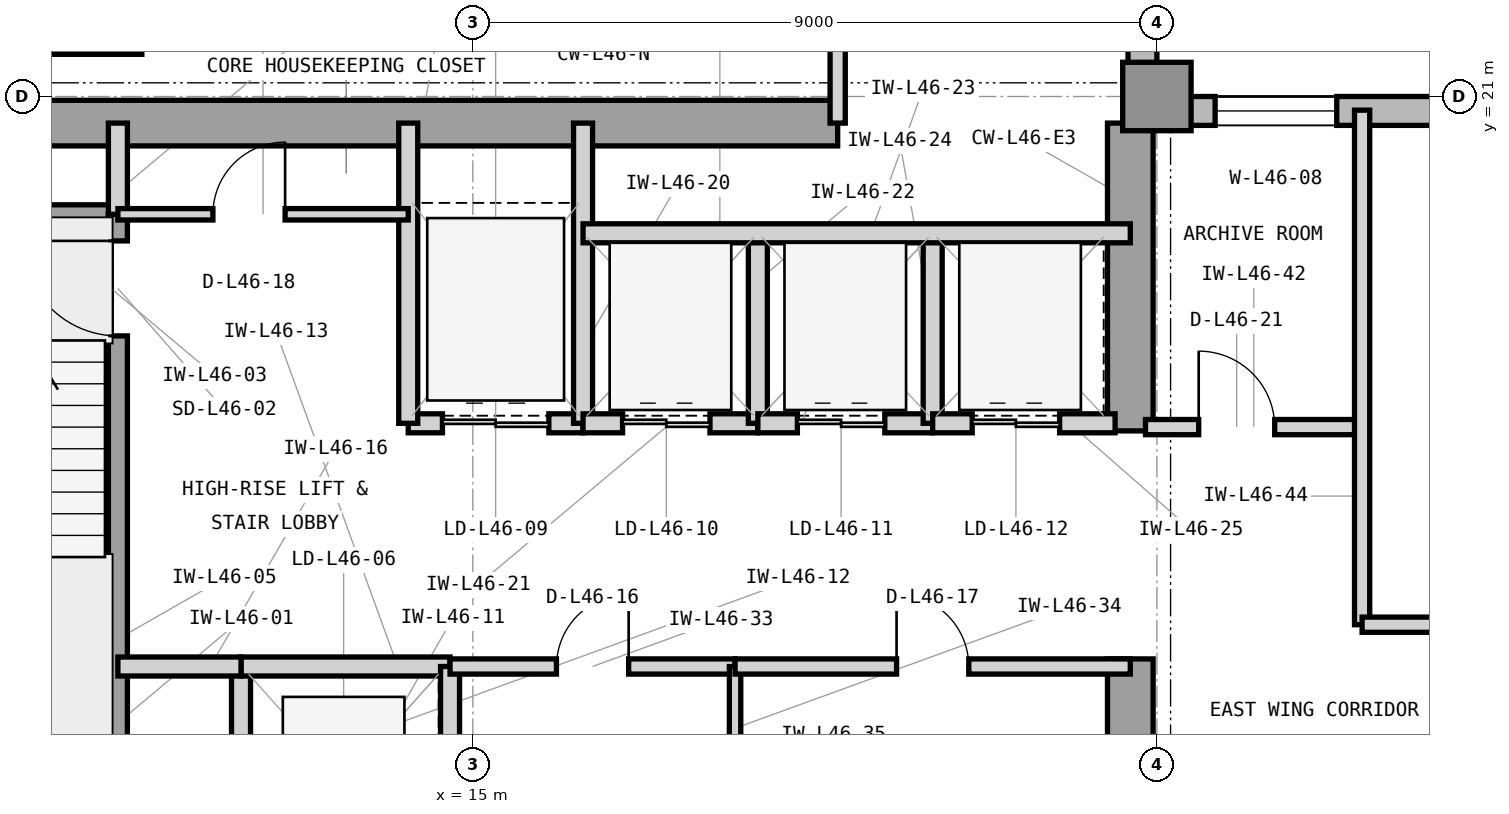
"""IFC4 building model, lengths in metres.
Left out: names, types, materials, properties, quantities, classifications, styles, units other than length and angle.
Written with IfcOpenShell. Run it as: python <this file> out.ifc"""

import sys

from ifc_helpers import new_model, si_unit, direction, frame, frame_2d, origin, origin_2d, place, context, subcontext, project, spatial, rectangle, extrude, element, fill, save


model = new_model("IFC4")
c1 = context("Model", 3, precision=1e-05, world=origin(), true_north=direction((0.0, 1.0)))
c2 = subcontext(c1, "Body", "Model", "MODEL_VIEW")
j1 = project(units=[si_unit("LENGTHUNIT", "METRE"), si_unit("PLANEANGLEUNIT", "RADIAN")], contexts=[c1])
p1 = place(None, origin())
s1 = spatial("IfcSite", under=j1, at=p1, CompositionType="ELEMENT")
p2 = place(p1, origin())
s2 = spatial("IfcBuilding", under=s1, at=p2, CompositionType="ELEMENT")
p3 = place(p2, frame((0.0, 0.0, 191.7)))
s3 = spatial("IfcBuildingStorey", under=s2, at=p3, CompositionType="ELEMENT", Elevation=191.7)
p4 = place(p3, frame((7.475, 20.65, 0.0), z_axis=(0.0, 0.0, 1.0), x_axis=(1.0, 0.0, 0.0)))
e1 = element("IfcWall", 1, at=p4, inside=s3, PredefinedType="SHEAR", context=c2, shape_type="SweptSolid", body=[
    extrude(rectangle(XDim=12.325, YDim=0.6, at=frame_2d((6.163, 0.0))), origin(), (0.0, 0.0, 1.0), 3.9),
])
p5 = place(p3, frame((23.65, 10.4, 0.0), z_axis=(0.0, 0.0, 1.0), x_axis=(0.0, 1.0, 0.0)))
e2 = element("IfcWall", 2, at=p5, inside=s3, PredefinedType="SHEAR", context=c2, shape_type="SweptSolid", body=[
    extrude(rectangle(XDim=3.2, YDim=0.6, at=frame_2d((1.6, 0.0))), origin(), (0.0, 0.0, 1.0), 3.9),
])
p6 = place(p3, frame((23.65, 16.6, 0.0), z_axis=(0.0, 0.0, 1.0), x_axis=(0.0, 1.0, 0.0)))
e3 = element("IfcWall", 3, at=p6, inside=s3, PredefinedType="SHEAR", context=c2, shape_type="SweptSolid", body=[
    extrude(rectangle(XDim=4.05, YDim=0.6, at=frame_2d((2.025, 0.0))), origin(), (0.0, 0.0, 1.0), 3.9),
])
p7 = place(p3, frame((24.0, 21.0, 0.0), z_axis=(0.0, 0.0, 1.0), x_axis=(1.0, 0.0, 0.0)))
e4 = element("IfcColumn", 4, at=p7, inside=s3, PredefinedType="COLUMN", context=c2, shape_type="SweptSolid", body=[
    extrude(rectangle(XDim=0.9, YDim=0.9, at=origin_2d()), origin(), (0.0, 0.0, 1.0), 3.9),
])
p8 = place(p3, frame((55.4, 20.81, 0.0), z_axis=(0.0, 0.0, 1.0), x_axis=(-1.0, 0.0, 0.0)))
e5 = element("IfcWall", 5, at=p8, inside=s3, PredefinedType="STANDARD", context=c2, shape_type="SweptSolid", body=[
    extrude(rectangle(XDim=31.4, YDim=0.38, at=frame_2d((15.7, 0.0))), origin(), (0.0, 0.0, 1.0), 3.7),
])
p9 = place(p8, frame((17.167, 0.0, 0.9)))
e6 = element("IfcOpeningElement", 6, at=p9, cuts=e5, PredefinedType="OPENING", context=c2, shape_type="SweptSolid", body=[
    extrude(rectangle(XDim=2.3, YDim=2.2, at=frame_2d((1.15, 1.1))), frame((0.0, 0.2, 0.0), z_axis=(0.0, -1.0, 0.0), x_axis=(1.0, 0.0, 0.0)), (0.0, 0.0, 1.0), 0.4),
])
p10 = place(p8, frame((29.034, 0.0, 0.9)))
e7 = element("IfcOpeningElement", 7, at=p10, cuts=e5, PredefinedType="OPENING", context=c2, shape_type="SweptSolid", body=[
    extrude(rectangle(XDim=1.6, YDim=2.2, at=frame_2d((0.8, 1.1))), frame((0.0, 0.2, 0.0), z_axis=(0.0, -1.0, 0.0), x_axis=(1.0, 0.0, 0.0)), (0.0, 0.0, 1.0), 0.4),
])
p11 = place(p8, frame((8.354, 0.0, 0.9)))
e8 = element("IfcOpeningElement", 8, at=p11, cuts=e5, PredefinedType="OPENING", context=c2, shape_type="SweptSolid", body=[
    extrude(rectangle(XDim=2.3, YDim=2.2, at=frame_2d((1.15, 1.1))), frame((0.0, 0.2, 0.0), z_axis=(0.0, -1.0, 0.0), x_axis=(1.0, 0.0, 0.0)), (0.0, 0.0, 1.0), 0.4),
])
p12 = place(p3, frame((23.81, 21.0, 0.0), z_axis=(0.0, 0.0, 1.0), x_axis=(0.0, 1.0, 0.0)))
e9 = element("IfcWall", 9, at=p12, inside=s3, PredefinedType="STANDARD", context=c2, shape_type="SweptSolid", body=[
    extrude(rectangle(XDim=22.4, YDim=0.38, at=frame_2d((11.2, 0.0))), origin(), (0.0, 0.0, 1.0), 3.7),
])
p13 = place(p3, frame((7.7, 19.45, 0.0), z_axis=(0.0, 0.0, 1.0), x_axis=(1.0, 0.0, 0.0)))
e10 = element("IfcWall", 10, at=p13, inside=s3, PredefinedType="SHEAR", context=c2, shape_type="SweptSolid", body=[
    extrude(rectangle(XDim=2.755, YDim=0.25, at=frame_2d((1.377, 0.0))), origin(), (0.0, 0.0, 1.0), 3.9),
])
p14 = place(p3, frame((10.33, 12.0, 0.0), z_axis=(0.0, 0.0, 1.0), x_axis=(0.0, 1.0, 0.0)))
e11 = element("IfcWall", 11, at=p14, inside=s3, PredefinedType="SHEAR", context=c2, shape_type="SweptSolid", body=[
    extrude(rectangle(XDim=7.45, YDim=0.25, at=frame_2d((3.725, 0.0))), origin(), (0.0, 0.0, 1.0), 3.9),
])
p15 = place(p14, frame((5.85, 0.0, 0.0)))
e12 = element("IfcOpeningElement", 12, at=p15, cuts=e11, PredefinedType="OPENING", context=c2, shape_type="SweptSolid", body=[
    extrude(rectangle(XDim=1.25, YDim=2.2, at=frame_2d((0.625, 1.1))), frame((0.0, 0.135, 0.0), z_axis=(0.0, -1.0, 0.0), x_axis=(1.0, 0.0, 0.0)), (0.0, 0.0, 1.0), 0.27),
])
p16 = place(p3, frame((10.33, 19.45, 0.0), z_axis=(0.0, 0.0, 1.0), x_axis=(0.0, 1.0, 0.0)))
e13 = element("IfcWall", 13, at=p16, inside=s3, PredefinedType="PARTITIONING", context=c2, shape_type="SweptSolid", body=[
    extrude(rectangle(XDim=1.2, YDim=0.25, at=frame_2d((0.6, 0.0))), origin(), (0.0, 0.0, 1.0), 3.073),
])
p17 = place(p3, frame((11.95, 10.5, 0.0), z_axis=(0.0, 0.0, 1.0), x_axis=(0.0, 1.0, 0.0)))
e14 = element("IfcWall", 14, at=p17, inside=s3, PredefinedType="PARTITIONING", context=c2, shape_type="SweptSolid", body=[
    extrude(rectangle(XDim=3.0, YDim=0.25, at=frame_2d((1.5, 0.0))), origin(), (0.0, 0.0, 1.0), 3.69),
])
p18 = place(p3, frame((11.95, 13.5, 0.0), z_axis=(0.0, 0.0, 1.0), x_axis=(1.0, 0.0, 0.0)))
e15 = element("IfcWall", 15, at=p18, inside=s3, PredefinedType="PARTITIONING", context=c2, shape_type="SweptSolid", body=[
    extrude(rectangle(XDim=2.75, YDim=0.25, at=frame_2d((1.375, 0.0))), origin(), (0.0, 0.0, 1.0), 3.283),
])
p19 = place(p3, frame((14.7, 10.5, 0.0), z_axis=(0.0, 0.0, 1.0), x_axis=(0.0, 1.0, 0.0)))
e16 = element("IfcWall", 16, at=p19, inside=s3, PredefinedType="PARTITIONING", context=c2, shape_type="SweptSolid", body=[
    extrude(rectangle(XDim=3.0, YDim=0.25, at=frame_2d((1.5, 0.0))), origin(), (0.0, 0.0, 1.0), 3.69),
])
p20 = place(p3, frame((10.33, 13.5, 0.0), z_axis=(0.0, 0.0, 1.0), x_axis=(1.0, 0.0, 0.0)))
e17 = element("IfcWall", 17, at=p20, inside=s3, PredefinedType="PARTITIONING", context=c2, shape_type="SweptSolid", body=[
    extrude(rectangle(XDim=1.62, YDim=0.25, at=frame_2d((0.81, 0.0))), origin(), (0.0, 0.0, 1.0), 3.283),
])
p21 = place(p3, frame((14.15, 16.7, 0.0), z_axis=(0.0, 0.0, 1.0), x_axis=(1.0, 0.0, 0.0)))
e18 = element("IfcWall", 18, at=p21, inside=s3, PredefinedType="PARTITIONING", context=c2, shape_type="SweptSolid", body=[
    extrude(rectangle(XDim=2.3, YDim=0.25, at=frame_2d((1.15, 0.0))), origin(), (0.0, 0.0, 1.0), 3.283),
])
p22 = place(p21, frame((0.45, 0.0, 0.0)))
e19 = element("IfcOpeningElement", 19, at=p22, cuts=e18, PredefinedType="OPENING", context=c2, shape_type="SweptSolid", body=[
    extrude(rectangle(XDim=1.4, YDim=2.35, at=frame_2d((0.7, 1.175))), frame((0.0, 0.135, 0.0), z_axis=(0.0, -1.0, 0.0), x_axis=(1.0, 0.0, 0.0)), (0.0, 0.0, 1.0), 0.27),
])
for number, where, z_axis, x_axis in (
    (20, (14.15, 16.7, 0.0), (0.0, 0.0, 1.0), (0.0, 1.0, 0.0)),
    (21, (16.45, 16.7, 0.0), (0.0, 0.0, 1.0), (0.0, 1.0, 0.0)),
):
    element("IfcWall", number, at=place(p3, frame(where, z_axis=z_axis, x_axis=x_axis)), inside=s3, PredefinedType="PARTITIONING", context=c2, shape_type="SweptSolid", body=[
        extrude(rectangle(XDim=3.95, YDim=0.25, at=frame_2d((1.975, 0.0))), origin(), (0.0, 0.0, 1.0), 3.69),
    ])
p23 = place(p3, frame((16.45, 16.7, 0.0), z_axis=(0.0, 0.0, 1.0), x_axis=(1.0, 0.0, 0.0)))
e22 = element("IfcWall", 22, at=p23, inside=s3, PredefinedType="PARTITIONING", context=c2, shape_type="SweptSolid", body=[
    extrude(rectangle(XDim=2.3, YDim=0.25, at=frame_2d((1.15, 0.0))), origin(), (0.0, 0.0, 1.0), 3.283),
])
p24 = place(p23, frame((0.52, 0.0, 0.0)))
e23 = element("IfcOpeningElement", 23, at=p24, cuts=e22, PredefinedType="OPENING", context=c2, shape_type="SweptSolid", body=[
    extrude(rectangle(XDim=1.15, YDim=2.25, at=frame_2d((0.575, 1.125))), frame((0.0, 0.135, 0.0), z_axis=(0.0, -1.0, 0.0), x_axis=(1.0, 0.0, 0.0)), (0.0, 0.0, 1.0), 0.27),
])
p25 = place(p3, frame((18.75, 16.7, 0.0), z_axis=(0.0, 0.0, 1.0), x_axis=(0.0, 1.0, 0.0)))
e24 = element("IfcWall", 24, at=p25, inside=s3, PredefinedType="PARTITIONING", context=c2, shape_type="SweptSolid", body=[
    extrude(rectangle(XDim=2.5, YDim=0.25, at=frame_2d((1.25, 0.0))), origin(), (0.0, 0.0, 1.0), 3.69),
])
p26 = place(p3, frame((18.75, 16.7, 0.0), z_axis=(0.0, 0.0, 1.0), x_axis=(1.0, 0.0, 0.0)))
e25 = element("IfcWall", 25, at=p26, inside=s3, PredefinedType="PARTITIONING", context=c2, shape_type="SweptSolid", body=[
    extrude(rectangle(XDim=2.3, YDim=0.25, at=frame_2d((1.15, 0.0))), origin(), (0.0, 0.0, 1.0), 3.283),
])
p27 = place(p26, frame((0.52, 0.0, 0.0)))
e26 = element("IfcOpeningElement", 26, at=p27, cuts=e25, PredefinedType="OPENING", context=c2, shape_type="SweptSolid", body=[
    extrude(rectangle(XDim=1.15, YDim=2.25, at=frame_2d((0.575, 1.125))), frame((0.0, 0.135, 0.0), z_axis=(0.0, -1.0, 0.0), x_axis=(1.0, 0.0, 0.0)), (0.0, 0.0, 1.0), 0.27),
])
p28 = place(p3, frame((21.05, 16.7, 0.0), z_axis=(0.0, 0.0, 1.0), x_axis=(0.0, 1.0, 0.0)))
e27 = element("IfcWall", 27, at=p28, inside=s3, PredefinedType="PARTITIONING", context=c2, shape_type="SweptSolid", body=[
    extrude(rectangle(XDim=2.5, YDim=0.25, at=frame_2d((1.25, 0.0))), origin(), (0.0, 0.0, 1.0), 3.69),
])
p29 = place(p3, frame((21.05, 16.7, 0.0), z_axis=(0.0, 0.0, 1.0), x_axis=(1.0, 0.0, 0.0)))
e28 = element("IfcWall", 28, at=p29, inside=s3, PredefinedType="PARTITIONING", context=c2, shape_type="SweptSolid", body=[
    extrude(rectangle(XDim=2.4, YDim=0.25, at=frame_2d((1.2, 0.0))), origin(), (0.0, 0.0, 1.0), 3.283),
])
p30 = place(p29, frame((0.52, 0.0, 0.0)))
e29 = element("IfcOpeningElement", 29, at=p30, cuts=e28, PredefinedType="OPENING", context=c2, shape_type="SweptSolid", body=[
    extrude(rectangle(XDim=1.15, YDim=2.25, at=frame_2d((0.575, 1.125))), frame((0.0, 0.135, 0.0), z_axis=(0.0, -1.0, 0.0), x_axis=(1.0, 0.0, 0.0)), (0.0, 0.0, 1.0), 0.27),
])
p31 = place(p3, frame((16.45, 19.2, 0.0), z_axis=(0.0, 0.0, 1.0), x_axis=(1.0, 0.0, 0.0)))
e30 = element("IfcWall", 30, at=p31, inside=s3, PredefinedType="PARTITIONING", context=c2, shape_type="SweptSolid", body=[
    extrude(rectangle(XDim=7.2, YDim=0.25, at=frame_2d((3.6, 0.0))), origin(), (0.0, 0.0, 1.0), 3.69),
])
p32 = place(p3, frame((14.7, 13.5, 0.0), z_axis=(0.0, 0.0, 1.0), x_axis=(1.0, 0.0, 0.0)))
e31 = element("IfcWall", 31, at=p32, inside=s3, PredefinedType="PARTITIONING", context=c2, shape_type="SweptSolid", body=[
    extrude(rectangle(XDim=3.75, YDim=0.2, at=frame_2d((1.875, 0.0))), origin(), (0.0, 0.0, 1.0), 3.283),
])
p33 = place(p32, frame((1.4, 0.0, 0.0)))
e32 = element("IfcOpeningElement", 32, at=p33, cuts=e31, PredefinedType="OPENING", context=c2, shape_type="SweptSolid", body=[
    extrude(rectangle(XDim=0.95, YDim=2.1, at=frame_2d((0.475, 1.05))), frame((0.0, 0.11, 0.0), z_axis=(0.0, -1.0, 0.0), x_axis=(1.0, 0.0, 0.0)), (0.0, 0.0, 1.0), 0.22),
])
p34 = place(p3, frame((18.45, 10.25, 0.0), z_axis=(0.0, 0.0, 1.0), x_axis=(0.0, 1.0, 0.0)))
e33 = element("IfcWall", 33, at=p34, inside=s3, PredefinedType="PARTITIONING", context=c2, shape_type="SweptSolid", body=[
    extrude(rectangle(XDim=3.25, YDim=0.15, at=frame_2d((1.625, 0.0))), origin(), (0.0, 0.0, 1.0), 3.69),
])
p35 = place(p3, frame((18.45, 13.5, 0.0), z_axis=(0.0, 0.0, 1.0), x_axis=(1.0, 0.0, 0.0)))
e34 = element("IfcWall", 34, at=p35, inside=s3, PredefinedType="PARTITIONING", context=c2, shape_type="SweptSolid", body=[
    extrude(rectangle(XDim=5.2, YDim=0.2, at=frame_2d((2.6, 0.0))), origin(), (0.0, 0.0, 1.0), 3.283),
])
p36 = place(p35, frame((2.125, 0.0, 0.0)))
e35 = element("IfcOpeningElement", 35, at=p36, cuts=e34, PredefinedType="OPENING", context=c2, shape_type="SweptSolid", body=[
    extrude(rectangle(XDim=0.95, YDim=2.1, at=frame_2d((0.475, 1.05))), frame((0.0, 0.11, 0.0), z_axis=(0.0, -1.0, 0.0), x_axis=(1.0, 0.0, 0.0)), (0.0, 0.0, 1.0), 0.22),
])
p37 = place(p3, frame((10.33, 19.45, 0.0), z_axis=(0.0, 0.0, 1.0), x_axis=(1.0, 0.0, 0.0)))
e36 = element("IfcWall", 36, at=p37, inside=s3, PredefinedType="PARTITIONING", context=c2, shape_type="SweptSolid", body=[
    extrude(rectangle(XDim=3.82, YDim=0.15, at=frame_2d((1.91, 0.0))), origin(), (0.0, 0.0, 1.0), 3.69),
])
p38 = place(p37, frame((1.25, 0.0, 0.0)))
e37 = element("IfcOpeningElement", 37, at=p38, cuts=e36, PredefinedType="OPENING", context=c2, shape_type="SweptSolid", body=[
    extrude(rectangle(XDim=0.95, YDim=2.1, at=frame_2d((0.475, 1.05))), frame((0.0, 0.085, 0.0), z_axis=(0.0, -1.0, 0.0), x_axis=(1.0, 0.0, 0.0)), (0.0, 0.0, 1.0), 0.17),
])
p39 = place(p3, frame((6.555, 21.68, 0.0), z_axis=(0.0, 0.0, 1.0), x_axis=(1.0, 0.0, 0.0)))
e38 = element("IfcWall", 38, at=p39, inside=s3, PredefinedType="SHEAR", context=c2, shape_type="SweptSolid", body=[
    extrude(rectangle(XDim=4.09, YDim=0.25, at=frame_2d((2.045, 0.0))), origin(), (0.0, 0.0, 1.0), 3.9),
])
p40 = place(p3, frame((23.85, 16.65, 0.0), z_axis=(0.0, 0.0, 1.0), x_axis=(1.0, 0.0, 0.0)))
e39 = element("IfcWall", 39, at=p40, inside=s3, PredefinedType="PARTITIONING", context=c2, shape_type="SweptSolid", body=[
    extrude(rectangle(XDim=2.85, YDim=0.2, at=frame_2d((1.425, 0.0))), origin(), (0.0, 0.0, 1.0), 3.69),
])
p41 = place(p40, frame((0.7, 0.0, 0.0)))
e40 = element("IfcOpeningElement", 40, at=p41, cuts=e39, PredefinedType="OPENING", context=c2, shape_type="SweptSolid", body=[
    extrude(rectangle(XDim=1.0, YDim=2.15, at=frame_2d((0.5, 1.075))), frame((0.0, 0.11, 0.0), z_axis=(0.0, -1.0, 0.0), x_axis=(1.0, 0.0, 0.0)), (0.0, 0.0, 1.0), 0.22),
])
p42 = place(p3, frame((26.7, 14.05, 0.0), z_axis=(0.0, 0.0, 1.0), x_axis=(0.0, 1.0, 0.0)))
e41 = element("IfcWall", 41, at=p42, inside=s3, PredefinedType="PARTITIONING", context=c2, shape_type="SweptSolid", body=[
    extrude(rectangle(XDim=6.77, YDim=0.2, at=frame_2d((3.385, 0.0))), origin(), (0.0, 0.0, 1.0), 3.69),
])
p43 = place(p3, frame((26.7, 14.05, 0.0), z_axis=(0.0, 0.0, 1.0), x_axis=(1.0, 0.0, 0.0)))
e42 = element("IfcWall", 42, at=p43, inside=s3, PredefinedType="PARTITIONING", context=c2, shape_type="SweptSolid", body=[
    extrude(rectangle(XDim=8.5, YDim=0.2, at=frame_2d((4.25, 0.0))), origin(), (0.0, 0.0, 1.0), 3.69),
])
p44 = place(p43, frame((3.5, 0.0, 0.0)))
e43 = element("IfcOpeningElement", 43, at=p44, cuts=e42, PredefinedType="OPENING", context=c2, shape_type="SweptSolid", body=[
    extrude(rectangle(XDim=1.5, YDim=2.3, at=frame_2d((0.75, 1.15))), frame((0.0, 0.11, 0.0), z_axis=(0.0, -1.0, 0.0), x_axis=(1.0, 0.0, 0.0)), (0.0, 0.0, 1.0), 0.22),
])
p45 = place(p3, frame((19.8, 20.65, 0.0), z_axis=(0.0, 0.0, 1.0), x_axis=(0.0, 1.0, 0.0)))
e44 = element("IfcWall", 44, at=p45, inside=s3, PredefinedType="PARTITIONING", context=c2, shape_type="SweptSolid", body=[
    extrude(rectangle(XDim=6.15, YDim=0.2, at=frame_2d((3.075, 0.0))), origin(), (0.0, 0.0, 1.0), 3.69),
])
p46 = place(p15, origin())
e45 = element("IfcDoor", 45, at=p46, inside=s3, OperationType="SINGLE_SWING_RIGHT", PredefinedType="DOOR", context=c2, shape_type="SweptSolid", body=[
    extrude(rectangle(XDim=1.25, YDim=2.2, at=frame_2d((0.625, 1.1))), frame((0.0, 0.025, 0.0), z_axis=(0.0, -1.0, 0.0), x_axis=(1.0, 0.0, 0.0)), (0.0, 0.0, 1.0), 0.05),
])
fill(e12, e45)
p47 = place(p22, origin())
e46 = element("IfcDoor", 46, at=p47, inside=s3, OperationType="DOUBLE_DOOR_SLIDING", PredefinedType="DOOR", context=c2, shape_type="SweptSolid", body=[
    extrude(rectangle(XDim=1.4, YDim=2.35, at=frame_2d((0.7, 1.175))), frame((0.0, 0.025, 0.0), z_axis=(0.0, -1.0, 0.0), x_axis=(1.0, 0.0, 0.0)), (0.0, 0.0, 1.0), 0.05),
])
fill(e19, e46)
p48 = place(p24, origin())
e47 = element("IfcDoor", 47, at=p48, inside=s3, OperationType="DOUBLE_DOOR_SLIDING", PredefinedType="DOOR", context=c2, shape_type="SweptSolid", body=[
    extrude(rectangle(XDim=1.15, YDim=2.25, at=frame_2d((0.575, 1.125))), frame((0.0, 0.025, 0.0), z_axis=(0.0, -1.0, 0.0), x_axis=(1.0, 0.0, 0.0)), (0.0, 0.0, 1.0), 0.05),
])
fill(e23, e47)
p49 = place(p27, origin())
e48 = element("IfcDoor", 48, at=p49, inside=s3, OperationType="DOUBLE_DOOR_SLIDING", PredefinedType="DOOR", context=c2, shape_type="SweptSolid", body=[
    extrude(rectangle(XDim=1.15, YDim=2.25, at=frame_2d((0.575, 1.125))), frame((0.0, 0.025, 0.0), z_axis=(0.0, -1.0, 0.0), x_axis=(1.0, 0.0, 0.0)), (0.0, 0.0, 1.0), 0.05),
])
fill(e26, e48)
p50 = place(p30, origin())
e49 = element("IfcDoor", 49, at=p50, inside=s3, OperationType="DOUBLE_DOOR_SLIDING", PredefinedType="DOOR", context=c2, shape_type="SweptSolid", body=[
    extrude(rectangle(XDim=1.15, YDim=2.25, at=frame_2d((0.575, 1.125))), frame((0.0, 0.025, 0.0), z_axis=(0.0, -1.0, 0.0), x_axis=(1.0, 0.0, 0.0)), (0.0, 0.0, 1.0), 0.05),
])
fill(e29, e49)
p51 = place(p33, origin())
e50 = element("IfcDoor", 50, at=p51, inside=s3, OperationType="SINGLE_SWING_RIGHT", PredefinedType="DOOR", context=c2, shape_type="SweptSolid", body=[
    extrude(rectangle(XDim=0.95, YDim=2.1, at=frame_2d((0.475, 1.05))), frame((0.0, 0.025, 0.0), z_axis=(0.0, -1.0, 0.0), x_axis=(1.0, 0.0, 0.0)), (0.0, 0.0, 1.0), 0.05),
])
fill(e32, e50)
p52 = place(p36, origin())
e51 = element("IfcDoor", 51, at=p52, inside=s3, OperationType="SINGLE_SWING_LEFT", PredefinedType="DOOR", context=c2, shape_type="SweptSolid", body=[
    extrude(rectangle(XDim=0.95, YDim=2.1, at=frame_2d((0.475, 1.05))), frame((0.0, 0.025, 0.0), z_axis=(0.0, -1.0, 0.0), x_axis=(1.0, 0.0, 0.0)), (0.0, 0.0, 1.0), 0.05),
])
fill(e35, e51)
p53 = place(p38, origin())
e52 = element("IfcDoor", 52, at=p53, inside=s3, OperationType="SINGLE_SWING_RIGHT", PredefinedType="DOOR", context=c2, shape_type="SweptSolid", body=[
    extrude(rectangle(XDim=0.95, YDim=2.1, at=frame_2d((0.475, 1.05))), frame((0.0, 0.025, 0.0), z_axis=(0.0, -1.0, 0.0), x_axis=(1.0, 0.0, 0.0)), (0.0, 0.0, 1.0), 0.05),
])
fill(e37, e52)
p54 = place(p41, origin())
e53 = element("IfcDoor", 53, at=p54, inside=s3, OperationType="SINGLE_SWING_LEFT", PredefinedType="DOOR", context=c2, shape_type="SweptSolid", body=[
    extrude(rectangle(XDim=1.0, YDim=2.15, at=frame_2d((0.5, 1.075))), frame((0.0, 0.025, 0.0), z_axis=(0.0, -1.0, 0.0), x_axis=(1.0, 0.0, 0.0)), (0.0, 0.0, 1.0), 0.05),
])
fill(e40, e53)
p55 = place(p10, origin())
e54 = element("IfcWindow", 54, at=p55, inside=s3, PartitioningType="SINGLE_PANEL", PredefinedType="WINDOW", context=c2, shape_type="SweptSolid", body=[
    extrude(rectangle(XDim=1.6, YDim=2.2, at=frame_2d((0.8, 1.1))), frame((0.0, 0.11, 0.0), z_axis=(0.0, -1.0, 0.0), x_axis=(1.0, 0.0, 0.0)), (0.0, 0.0, 1.0), 0.06),
])
fill(e7, e54)
save(model, sys.argv[1])
